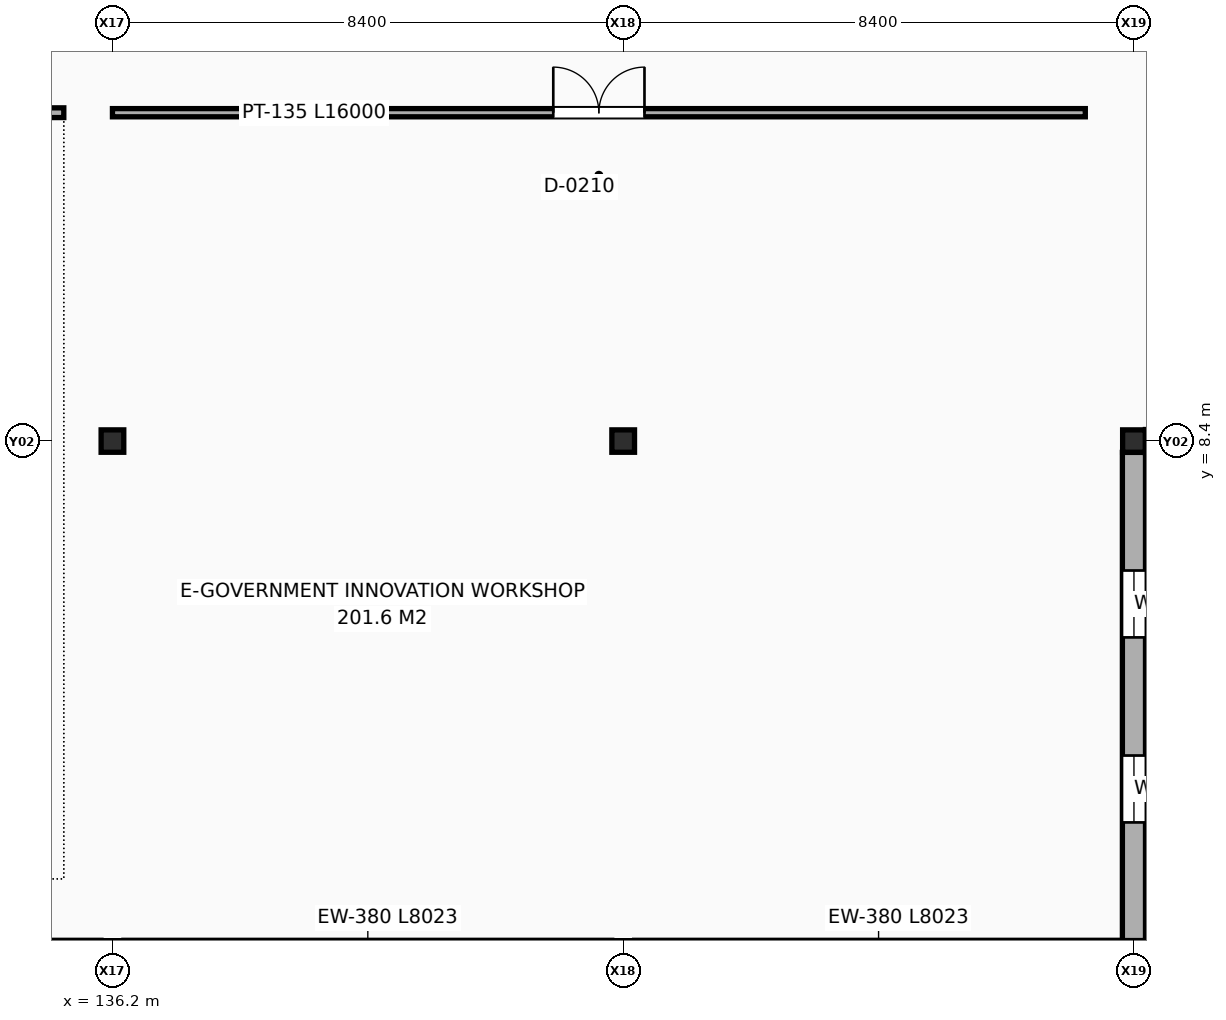
"""IFC4 building model, lengths in metres.
Left out: names, types, materials, properties, quantities, classifications, styles, units other than length and angle.
Written with IfcOpenShell. Run it as: python <this file> out.ifc"""

import sys

from ifc_helpers import new_model, si_unit, direction, frame, frame_2d, origin, origin_2d, place, context, subcontext, project, spatial, rectangle, i_section, extrude, element, fill, save


model = new_model("IFC4")
c1 = context("Model", 3, precision=1e-05, world=origin(), true_north=direction((0.0, 1.0)))
c2 = subcontext(c1, "Body", "Model", "MODEL_VIEW")
j1 = project(units=[si_unit("LENGTHUNIT", "METRE"), si_unit("PLANEANGLEUNIT", "RADIAN")], contexts=[c1])
p1 = place(None, origin())
s1 = spatial("IfcSite", under=j1, at=p1, CompositionType="ELEMENT")
p2 = place(p1, origin())
s2 = spatial("IfcBuilding", under=s1, at=p2, CompositionType="ELEMENT")
p3 = place(p2, frame((0.0, 0.0, 9.6)))
s3 = spatial("IfcBuildingStorey", under=s2, at=p3, CompositionType="ELEMENT", Elevation=9.6)
for number, where, z_axis, x_axis in (
    (1, (136.2, 8.4, 0.0), (0.0, 0.0, 1.0), (1.0, 0.0, 0.0)),
    (2, (144.6, 8.4, 0.0), (0.0, 0.0, 1.0), (1.0, 0.0, 0.0)),
    (3, (153.0, 8.4, 0.0), (0.0, 0.0, 1.0), (1.0, 0.0, 0.0)),
):
    element("IfcColumn", number, at=place(p3, frame(where, z_axis=z_axis, x_axis=x_axis)), inside=s3, PredefinedType="COLUMN", context=c2, shape_type="SweptSolid", body=[
        extrude(i_section(OverallWidth=0.373, OverallDepth=0.368, WebThickness=0.014, FlangeThickness=0.024, FilletRadius=0.015, at=origin_2d()), origin(), (0.0, 0.0, 1.0), 4.2),
    ])
p4 = place(p3, frame((153.0, 0.186, 0.0), z_axis=(0.0, 0.0, 1.0), x_axis=(0.0, 1.0, 0.0)))
e4 = element("IfcWall", 4, at=p4, inside=s3, PredefinedType="SOLIDWALL", context=c2, shape_type="SweptSolid", body=[
    extrude(rectangle(XDim=8.028, YDim=0.38, at=frame_2d((4.014, 0.0))), origin(), (0.0, 0.0, 1.0), 3.17),
])
p5 = place(p4, frame((1.943, 0.0, 0.9)))
e5 = element("IfcOpeningElement", 5, at=p5, cuts=e4, PredefinedType="OPENING", context=c2, shape_type="SweptSolid", body=[
    extrude(rectangle(XDim=1.1, YDim=1.8, at=frame_2d((0.55, 0.9))), frame((0.0, 0.2, 0.0), z_axis=(0.0, -1.0, 0.0), x_axis=(1.0, 0.0, 0.0)), (0.0, 0.0, 1.0), 0.4),
])
p6 = place(p4, frame((4.985, 0.0, 0.9)))
e6 = element("IfcOpeningElement", 6, at=p6, cuts=e4, PredefinedType="OPENING", context=c2, shape_type="SweptSolid", body=[
    extrude(rectangle(XDim=1.1, YDim=1.8, at=frame_2d((0.55, 0.9))), frame((0.0, 0.2, 0.0), z_axis=(0.0, -1.0, 0.0), x_axis=(1.0, 0.0, 0.0)), (0.0, 0.0, 1.0), 0.4),
])
p7 = place(p3, frame((153.188, 8.4, 0.0), z_axis=(0.0, 0.0, 1.0), x_axis=(1.0, 0.0, 0.0)))
e7 = element("IfcWall", 7, at=p7, inside=s3, PredefinedType="SOLIDWALL", context=c2, shape_type="SweptSolid", body=[
    extrude(rectangle(XDim=8.023, YDim=0.38, at=frame_2d((4.012, 0.0))), origin(), (0.0, 0.0, 1.0), 2.97),
])
p8 = place(p7, frame((1.708, 0.0, 0.9)))
e8 = element("IfcOpeningElement", 8, at=p8, cuts=e7, PredefinedType="OPENING", context=c2, shape_type="SweptSolid", body=[
    extrude(rectangle(XDim=1.45, YDim=1.5, at=frame_2d((0.725, 0.75))), frame((0.0, 0.2, 0.0), z_axis=(0.0, -1.0, 0.0), x_axis=(1.0, 0.0, 0.0)), (0.0, 0.0, 1.0), 0.4),
])
p9 = place(p7, frame((4.865, 0.0, 0.9)))
e9 = element("IfcOpeningElement", 9, at=p9, cuts=e7, PredefinedType="OPENING", context=c2, shape_type="SweptSolid", body=[
    extrude(rectangle(XDim=1.45, YDim=1.5, at=frame_2d((0.725, 0.75))), frame((0.0, 0.2, 0.0), z_axis=(0.0, -1.0, 0.0), x_axis=(1.0, 0.0, 0.0)), (0.0, 0.0, 1.0), 0.4),
])
p10 = place(p3, frame((112.0, 13.8, 0.0), z_axis=(0.0, 0.0, 1.0), x_axis=(1.0, 0.0, 0.0)))
e10 = element("IfcWall", 10, at=p10, inside=s3, PredefinedType="PARTITIONING", context=c2, shape_type="SweptSolid", body=[
    extrude(rectangle(XDim=23.4, YDim=0.16, at=frame_2d((11.7, 0.0))), origin(), (0.0, 0.0, 1.0), 3.664),
])
p11 = place(p10, frame((11.2, 0.0, 0.0)))
e11 = element("IfcOpeningElement", 11, at=p11, cuts=e10, PredefinedType="OPENING", context=c2, shape_type="SweptSolid", body=[
    extrude(rectangle(XDim=1.0, YDim=2.1, at=frame_2d((0.5, 1.05))), frame((0.0, 0.09, 0.0), z_axis=(0.0, -1.0, 0.0), x_axis=(1.0, 0.0, 0.0)), (0.0, 0.0, 1.0), 0.18),
])
p12 = place(p3, frame((136.2, 13.8, 0.0), z_axis=(0.0, 0.0, 1.0), x_axis=(1.0, 0.0, 0.0)))
e12 = element("IfcWall", 12, at=p12, inside=s3, PredefinedType="PARTITIONING", context=c2, shape_type="SweptSolid", body=[
    extrude(rectangle(XDim=16.0, YDim=0.135, at=frame_2d((8.0, 0.0))), origin(), (0.0, 0.0, 1.0), 3.664),
])
p13 = place(p12, frame((7.25, 0.0, 0.0)))
e13 = element("IfcOpeningElement", 13, at=p13, cuts=e12, PredefinedType="OPENING", context=c2, shape_type="SweptSolid", body=[
    extrude(rectangle(XDim=1.5, YDim=2.35, at=frame_2d((0.75, 1.175))), frame((0.0, 0.077, 0.0), z_axis=(0.0, -1.0, 0.0), x_axis=(1.0, 0.0, 0.0)), (0.0, 0.0, 1.0), 0.155),
])
p14 = place(p5, origin())
e14 = element("IfcWindow", 14, at=p14, inside=s3, PartitioningType="SINGLE_PANEL", PredefinedType="WINDOW", context=c2, shape_type="SweptSolid", body=[
    extrude(rectangle(XDim=1.1, YDim=1.8, at=frame_2d((0.55, 0.9))), frame((0.0, 0.03, 0.0), z_axis=(0.0, -1.0, 0.0), x_axis=(1.0, 0.0, 0.0)), (0.0, 0.0, 1.0), 0.06),
])
fill(e5, e14)
p15 = place(p6, origin())
e15 = element("IfcWindow", 15, at=p15, inside=s3, PartitioningType="SINGLE_PANEL", PredefinedType="WINDOW", context=c2, shape_type="SweptSolid", body=[
    extrude(rectangle(XDim=1.1, YDim=1.8, at=frame_2d((0.55, 0.9))), frame((0.0, 0.03, 0.0), z_axis=(0.0, -1.0, 0.0), x_axis=(1.0, 0.0, 0.0)), (0.0, 0.0, 1.0), 0.06),
])
fill(e6, e15)
p16 = place(p13, origin())
e16 = element("IfcDoor", 16, at=p16, inside=s3, OperationType="DOUBLE_DOOR_SINGLE_SWING", PredefinedType="DOOR", context=c2, shape_type="SweptSolid", body=[
    extrude(rectangle(XDim=1.5, YDim=2.35, at=frame_2d((0.75, 1.175))), frame((0.0, 0.025, 0.0), z_axis=(0.0, -1.0, 0.0), x_axis=(1.0, 0.0, 0.0)), (0.0, 0.0, 1.0), 0.05),
])
fill(e13, e16)
save(model, sys.argv[1])
